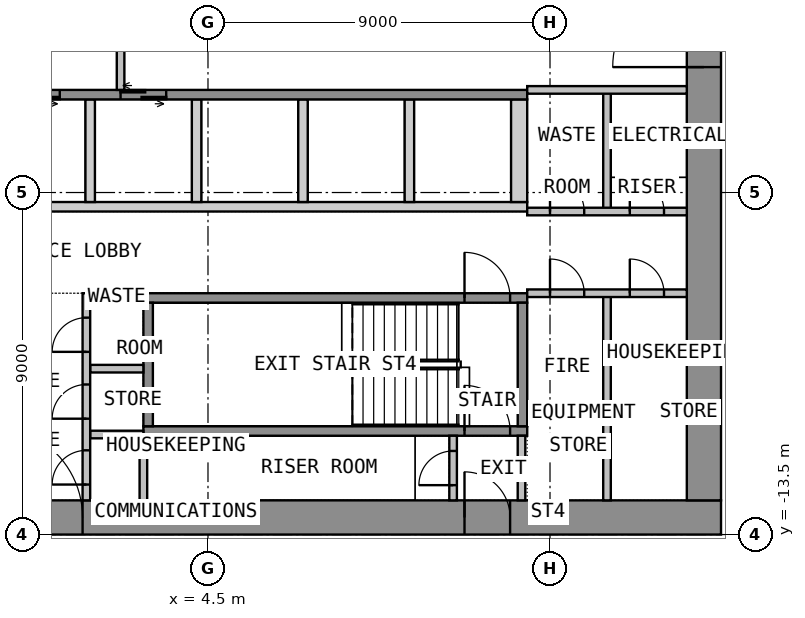
"""IFC4 building model, lengths in metres.
Left out: names, types, materials, properties, quantities, classifications, styles, units other than length and angle.
Written with IfcOpenShell. Run it as: python <this file> out.ifc"""

import sys

from ifc_helpers import new_model, si_unit, direction, frame, frame_2d, origin, place, context, subcontext, project, spatial, polyline, rectangle, outline, extrude, element, fill, save


model = new_model("IFC4")
c1 = context("Model", 3, precision=1e-05, world=origin(), true_north=direction((0.0, 1.0)))
c2 = subcontext(c1, "Body", "Model", "MODEL_VIEW")
j1 = project(units=[si_unit("LENGTHUNIT", "METRE"), si_unit("PLANEANGLEUNIT", "RADIAN")], contexts=[c1])
p1 = place(None, origin())
s1 = spatial("IfcSite", under=j1, at=p1, CompositionType="ELEMENT")
p2 = place(p1, origin())
s2 = spatial("IfcBuilding", under=s1, at=p2, CompositionType="ELEMENT")
p3 = place(p2, frame((0.0, 0.0, 30.0)))
s3 = spatial("IfcBuildingStorey", under=s2, at=p3, CompositionType="ELEMENT", Elevation=30.0)
p4 = place(p3, frame((-18.0, -13.05, 0.0), z_axis=(0.0, 0.0, 1.0), x_axis=(1.0, 0.0, 0.0)))
e1 = element("IfcWall", 1, at=p4, inside=s3, PredefinedType="SHEAR", context=c2, shape_type="SweptSolid", body=[
    extrude(rectangle(XDim=36.0, YDim=0.9, at=frame_2d((18.0, 0.0))), origin(), (0.0, 0.0, 1.0), 3.525),
])
p5 = place(p4, frame((16.8, 0.0, 0.0)))
e2 = element("IfcOpeningElement", 2, at=p5, cuts=e1, PredefinedType="OPENING", context=c2, shape_type="SweptSolid", body=[
    extrude(rectangle(XDim=2.4, YDim=2.1, at=frame_2d((1.2, 1.05))), frame((0.0, 0.46, 0.0), z_axis=(0.0, -1.0, 0.0), x_axis=(1.0, 0.0, 0.0)), (0.0, 0.0, 1.0), 0.92),
])
p6 = place(p4, frame((5.55, 0.0, 0.0)))
e3 = element("IfcOpeningElement", 3, at=p6, cuts=e1, PredefinedType="OPENING", context=c2, shape_type="SweptSolid", body=[
    extrude(rectangle(XDim=1.2, YDim=2.1, at=frame_2d((0.6, 1.05))), frame((0.0, 0.46, 0.0), z_axis=(0.0, -1.0, 0.0), x_axis=(1.0, 0.0, 0.0)), (0.0, 0.0, 1.0), 0.92),
])
p7 = place(p4, frame((29.25, 0.0, 0.0)))
e4 = element("IfcOpeningElement", 4, at=p7, cuts=e1, PredefinedType="OPENING", context=c2, shape_type="SweptSolid", body=[
    extrude(rectangle(XDim=1.2, YDim=2.1, at=frame_2d((0.6, 1.05))), frame((0.0, 0.46, 0.0), z_axis=(0.0, -1.0, 0.0), x_axis=(1.0, 0.0, 0.0)), (0.0, 0.0, 1.0), 0.92),
])
p8 = place(p3, frame((17.55, -12.6, 0.0), z_axis=(0.0, 0.0, 1.0), x_axis=(0.0, 1.0, 0.0)))
e5 = element("IfcWall", 5, at=p8, inside=s3, PredefinedType="SHEAR", context=c2, shape_type="SweptSolid", body=[
    extrude(rectangle(XDim=25.2, YDim=0.9, at=frame_2d((12.6, 0.0))), origin(), (0.0, 0.0, 1.0), 3.525),
])
p9 = place(p8, frame((11.4, 0.0, 0.0)))
e6 = element("IfcOpeningElement", 6, at=p9, cuts=e5, PredefinedType="OPENING", context=c2, shape_type="SweptSolid", body=[
    extrude(rectangle(XDim=2.4, YDim=2.1, at=frame_2d((1.2, 1.05))), frame((0.0, 0.46, 0.0), z_axis=(0.0, -1.0, 0.0), x_axis=(1.0, 0.0, 0.0)), (0.0, 0.0, 1.0), 0.92),
])
p10 = place(p3, origin())
e7 = element("IfcWall", 7, at=p10, inside=s3, PredefinedType="SHEAR", context=c2, shape_type="SweptSolid", body=[
    extrude(outline(polyline([(-12.9, -5.0), (12.9, -5.0), (12.9, -4.75), (-12.9, -4.75), (-12.9, -5.0)])), origin(), (0.0, 0.0, 1.0), 3.525),
])
p11 = place(p3, origin())
e8 = element("IfcWall", 8, at=p11, inside=s3, PredefinedType="SHEAR", context=c2, shape_type="SweptSolid", body=[
    extrude(outline(polyline([(1.275, -4.75), (1.525, -4.75), (1.525, -2.05), (1.275, -2.05), (1.275, -4.75)])), origin(), (0.0, 0.0, 1.0), 3.525),
])
p12 = place(p3, origin())
e9 = element("IfcWall", 9, at=p12, inside=s3, PredefinedType="SHEAR", context=c2, shape_type="SweptSolid", body=[
    extrude(outline(polyline([(4.075, -4.75), (4.325, -4.75), (4.325, -2.05), (4.075, -2.05), (4.075, -4.75)])), origin(), (0.0, 0.0, 1.0), 3.525),
])
p13 = place(p3, origin())
e10 = element("IfcWall", 10, at=p13, inside=s3, PredefinedType="SHEAR", context=c2, shape_type="SweptSolid", body=[
    extrude(outline(polyline([(6.875, -4.75), (7.125, -4.75), (7.125, -2.05), (6.875, -2.05), (6.875, -4.75)])), origin(), (0.0, 0.0, 1.0), 3.525),
])
p14 = place(p3, origin())
e11 = element("IfcWall", 11, at=p14, inside=s3, PredefinedType="SHEAR", context=c2, shape_type="SweptSolid", body=[
    extrude(outline(polyline([(9.675, -4.75), (9.925, -4.75), (9.925, -2.05), (9.675, -2.05), (9.675, -4.75)])), origin(), (0.0, 0.0, 1.0), 3.525),
])
p15 = place(p3, origin())
e12 = element("IfcWall", 12, at=p15, inside=s3, PredefinedType="SHEAR", context=c2, shape_type="SweptSolid", body=[
    extrude(outline(polyline([(12.475, -4.75), (12.9, -4.75), (12.9, -2.05), (12.475, -2.05), (12.475, -4.75)])), origin(), (0.0, 0.0, 1.0), 3.525),
])
p16 = place(p3, frame((-12.9, -1.925, 0.0), z_axis=(0.0, 0.0, 1.0), x_axis=(1.0, 0.0, 0.0)))
e13 = element("IfcWall", 13, at=p16, inside=s3, PredefinedType="SHEAR", context=c2, shape_type="SweptSolid", body=[
    extrude(rectangle(XDim=25.8, YDim=0.25, at=frame_2d((12.9, 0.0))), origin(), (0.0, 0.0, 1.0), 3.525),
])
p17 = place(p16, frame((1.1, 0.0, 0.0)))
e14 = element("IfcOpeningElement", 14, at=p17, cuts=e13, PredefinedType="OPENING", context=c2, shape_type="SweptSolid", body=[
    extrude(rectangle(XDim=1.2, YDim=2.1, at=frame_2d((0.6, 1.05))), frame((0.0, 0.135, 0.0), z_axis=(0.0, -1.0, 0.0), x_axis=(1.0, 0.0, 0.0)), (0.0, 0.0, 1.0), 0.27),
])
p18 = place(p16, frame((3.9, 0.0, 0.0)))
e15 = element("IfcOpeningElement", 15, at=p18, cuts=e13, PredefinedType="OPENING", context=c2, shape_type="SweptSolid", body=[
    extrude(rectangle(XDim=1.2, YDim=2.1, at=frame_2d((0.6, 1.05))), frame((0.0, 0.135, 0.0), z_axis=(0.0, -1.0, 0.0), x_axis=(1.0, 0.0, 0.0)), (0.0, 0.0, 1.0), 0.27),
])
p19 = place(p16, frame((6.7, 0.0, 0.0)))
e16 = element("IfcOpeningElement", 16, at=p19, cuts=e13, PredefinedType="OPENING", context=c2, shape_type="SweptSolid", body=[
    extrude(rectangle(XDim=1.2, YDim=2.1, at=frame_2d((0.6, 1.05))), frame((0.0, 0.135, 0.0), z_axis=(0.0, -1.0, 0.0), x_axis=(1.0, 0.0, 0.0)), (0.0, 0.0, 1.0), 0.27),
])
p20 = place(p16, frame((9.5, 0.0, 0.0)))
e17 = element("IfcOpeningElement", 17, at=p20, cuts=e13, PredefinedType="OPENING", context=c2, shape_type="SweptSolid", body=[
    extrude(rectangle(XDim=1.2, YDim=2.1, at=frame_2d((0.6, 1.05))), frame((0.0, 0.135, 0.0), z_axis=(0.0, -1.0, 0.0), x_axis=(1.0, 0.0, 0.0)), (0.0, 0.0, 1.0), 0.27),
])
p21 = place(p16, frame((12.3, 0.0, 0.0)))
e18 = element("IfcOpeningElement", 18, at=p21, cuts=e13, PredefinedType="OPENING", context=c2, shape_type="SweptSolid", body=[
    extrude(rectangle(XDim=1.2, YDim=2.1, at=frame_2d((0.6, 1.05))), frame((0.0, 0.135, 0.0), z_axis=(0.0, -1.0, 0.0), x_axis=(1.0, 0.0, 0.0)), (0.0, 0.0, 1.0), 0.27),
])
p22 = place(p16, frame((15.1, 0.0, 0.0)))
e19 = element("IfcOpeningElement", 19, at=p22, cuts=e13, PredefinedType="OPENING", context=c2, shape_type="SweptSolid", body=[
    extrude(rectangle(XDim=1.2, YDim=2.1, at=frame_2d((0.6, 1.05))), frame((0.0, 0.135, 0.0), z_axis=(0.0, -1.0, 0.0), x_axis=(1.0, 0.0, 0.0)), (0.0, 0.0, 1.0), 0.27),
])
p23 = place(p3, frame((2.2, -1.8, 0.0), z_axis=(0.0, 0.0, 1.0), x_axis=(0.0, 1.0, 0.0)))
e20 = element("IfcWall", 20, at=p23, inside=s3, PredefinedType="PARTITIONING", context=c2, shape_type="SweptSolid", body=[
    extrude(rectangle(XDim=3.6, YDim=0.2, at=frame_2d((1.8, 0.0))), origin(), (0.0, 0.0, 1.0), 3.525),
])
p24 = place(p23, frame((1.2, 0.0, 0.0)))
e21 = element("IfcOpeningElement", 21, at=p24, cuts=e20, PredefinedType="OPENING", context=c2, shape_type="SweptSolid", body=[
    extrude(rectangle(XDim=1.2, YDim=2.1, at=frame_2d((0.6, 1.05))), frame((0.0, 0.11, 0.0), z_axis=(0.0, -1.0, 0.0), x_axis=(1.0, 0.0, 0.0)), (0.0, 0.0, 1.0), 0.22),
])
p25 = place(p3, frame((2.8, -10.775, 0.0), z_axis=(0.0, 0.0, 1.0), x_axis=(1.0, 0.0, 0.0)))
e22 = element("IfcWall", 22, at=p25, inside=s3, PredefinedType="SHEAR", context=c2, shape_type="SweptSolid", body=[
    extrude(rectangle(XDim=10.1, YDim=0.25, at=frame_2d((5.05, 0.0))), origin(), (0.0, 0.0, 1.0), 3.525),
])
p26 = place(p25, frame((8.45, 0.0, 0.0)))
e23 = element("IfcOpeningElement", 23, at=p26, cuts=e22, PredefinedType="OPENING", context=c2, shape_type="SweptSolid", body=[
    extrude(rectangle(XDim=1.2, YDim=2.1, at=frame_2d((0.6, 1.05))), frame((0.0, 0.135, 0.0), z_axis=(0.0, -1.0, 0.0), x_axis=(1.0, 0.0, 0.0)), (0.0, 0.0, 1.0), 0.27),
])
p27 = place(p3, frame((2.8, -7.275, 0.0), z_axis=(0.0, 0.0, 1.0), x_axis=(1.0, 0.0, 0.0)))
e24 = element("IfcWall", 24, at=p27, inside=s3, PredefinedType="SHEAR", context=c2, shape_type="SweptSolid", body=[
    extrude(rectangle(XDim=10.1, YDim=0.25, at=frame_2d((5.05, 0.0))), origin(), (0.0, 0.0, 1.0), 3.525),
])
p28 = place(p27, frame((8.45, 0.0, 0.0)))
e25 = element("IfcOpeningElement", 25, at=p28, cuts=e24, PredefinedType="OPENING", context=c2, shape_type="SweptSolid", body=[
    extrude(rectangle(XDim=1.2, YDim=2.1, at=frame_2d((0.6, 1.05))), frame((0.0, 0.135, 0.0), z_axis=(0.0, -1.0, 0.0), x_axis=(1.0, 0.0, 0.0)), (0.0, 0.0, 1.0), 0.27),
])
for number, where, z_axis, x_axis in (
    (26, (2.925, -10.65, 0.0), (0.0, 0.0, 1.0), (0.0, 1.0, 0.0)),
    (27, (12.775, -10.65, 0.0), (0.0, 0.0, 1.0), (0.0, 1.0, 0.0)),
):
    element("IfcWall", number, at=place(p3, frame(where, z_axis=z_axis, x_axis=x_axis)), inside=s3, PredefinedType="SHEAR", context=c2, shape_type="SweptSolid", body=[
        extrude(rectangle(XDim=3.25, YDim=0.25, at=frame_2d((1.625, 0.0))), origin(), (0.0, 0.0, 1.0), 3.525),
    ])
for number, where, z_axis, x_axis in (
    (28, (1.4, -7.25, 0.0), (0.0, 0.0, 1.0), (1.0, 0.0, 0.0)),
    (29, (1.4, -9.135, 0.0), (0.0, 0.0, 1.0), (1.0, 0.0, 0.0)),
    (30, (1.4, -10.867, 0.0), (0.0, 0.0, 1.0), (1.0, 0.0, 0.0)),
):
    element("IfcWall", number, at=place(p3, frame(where, z_axis=z_axis, x_axis=x_axis)), inside=s3, PredefinedType="PARTITIONING", context=c2, shape_type="SweptSolid", body=[
        extrude(rectangle(XDim=1.4, YDim=0.2, at=frame_2d((0.7, 0.0))), origin(), (0.0, 0.0, 1.0), 3.525),
    ])
p29 = place(p3, frame((1.3, -12.6, 0.0), z_axis=(0.0, 0.0, 1.0), x_axis=(0.0, 1.0, 0.0)))
e31 = element("IfcWall", 31, at=p29, inside=s3, PredefinedType="PARTITIONING", context=c2, shape_type="SweptSolid", body=[
    extrude(rectangle(XDim=5.45, YDim=0.2, at=frame_2d((2.725, 0.0))), origin(), (0.0, 0.0, 1.0), 3.525),
])
p30 = place(p29, frame((0.416, 0.0, 0.0)))
e32 = element("IfcOpeningElement", 32, at=p30, cuts=e31, PredefinedType="OPENING", context=c2, shape_type="SweptSolid", body=[
    extrude(rectangle(XDim=0.9, YDim=2.1, at=frame_2d((0.45, 1.05))), frame((0.0, 0.11, 0.0), z_axis=(0.0, -1.0, 0.0), x_axis=(1.0, 0.0, 0.0)), (0.0, 0.0, 1.0), 0.22),
])
p31 = place(p29, frame((2.149, 0.0, 0.0)))
e33 = element("IfcOpeningElement", 33, at=p31, cuts=e31, PredefinedType="OPENING", context=c2, shape_type="SweptSolid", body=[
    extrude(rectangle(XDim=0.9, YDim=2.1, at=frame_2d((0.45, 1.05))), frame((0.0, 0.11, 0.0), z_axis=(0.0, -1.0, 0.0), x_axis=(1.0, 0.0, 0.0)), (0.0, 0.0, 1.0), 0.22),
])
p32 = place(p29, frame((3.907, 0.0, 0.0)))
e34 = element("IfcOpeningElement", 34, at=p32, cuts=e31, PredefinedType="OPENING", context=c2, shape_type="SweptSolid", body=[
    extrude(rectangle(XDim=0.9, YDim=2.1, at=frame_2d((0.45, 1.05))), frame((0.0, 0.11, 0.0), z_axis=(0.0, -1.0, 0.0), x_axis=(1.0, 0.0, 0.0)), (0.0, 0.0, 1.0), 0.22),
])
p33 = place(p3, frame((12.75, -12.6, 0.0), z_axis=(0.0, 0.0, 1.0), x_axis=(0.0, 1.0, 0.0)))
e35 = element("IfcWall", 35, at=p33, inside=s3, PredefinedType="PARTITIONING", context=c2, shape_type="SweptSolid", body=[
    extrude(rectangle(XDim=1.7, YDim=0.2, at=frame_2d((0.85, 0.0))), origin(), (0.0, 0.0, 1.0), 3.525),
])
p34 = place(p3, frame((10.95, -12.6, 0.0), z_axis=(0.0, 0.0, 1.0), x_axis=(0.0, 1.0, 0.0)))
e36 = element("IfcWall", 36, at=p34, inside=s3, PredefinedType="PARTITIONING", context=c2, shape_type="SweptSolid", body=[
    extrude(rectangle(XDim=1.7, YDim=0.2, at=frame_2d((0.85, 0.0))), origin(), (0.0, 0.0, 1.0), 3.525),
])
p35 = place(p34, frame((0.4, 0.0, 0.0)))
e37 = element("IfcOpeningElement", 37, at=p35, cuts=e36, PredefinedType="OPENING", context=c2, shape_type="SweptSolid", body=[
    extrude(rectangle(XDim=0.9, YDim=2.1, at=frame_2d((0.45, 1.05))), frame((0.0, 0.11, 0.0), z_axis=(0.0, -1.0, 0.0), x_axis=(1.0, 0.0, 0.0)), (0.0, 0.0, 1.0), 0.22),
])
p36 = place(p3, frame((15.0, -12.6, 0.0), z_axis=(0.0, 0.0, 1.0), x_axis=(0.0, 1.0, 0.0)))
e38 = element("IfcWall", 38, at=p36, inside=s3, PredefinedType="PARTITIONING", context=c2, shape_type="SweptSolid", body=[
    extrude(rectangle(XDim=5.45, YDim=0.2, at=frame_2d((2.725, 0.0))), origin(), (0.0, 0.0, 1.0), 3.525),
])
p37 = place(p3, frame((12.9, -7.15, 0.0), z_axis=(0.0, 0.0, 1.0), x_axis=(1.0, 0.0, 0.0)))
e39 = element("IfcWall", 39, at=p37, inside=s3, PredefinedType="PARTITIONING", context=c2, shape_type="SweptSolid", body=[
    extrude(rectangle(XDim=4.2, YDim=0.2, at=frame_2d((2.1, 0.0))), origin(), (0.0, 0.0, 1.0), 3.525),
])
p38 = place(p37, frame((0.6, 0.0, 0.0)))
e40 = element("IfcOpeningElement", 40, at=p38, cuts=e39, PredefinedType="OPENING", context=c2, shape_type="SweptSolid", body=[
    extrude(rectangle(XDim=0.9, YDim=2.1, at=frame_2d((0.45, 1.05))), frame((0.0, 0.11, 0.0), z_axis=(0.0, -1.0, 0.0), x_axis=(1.0, 0.0, 0.0)), (0.0, 0.0, 1.0), 0.22),
])
p39 = place(p37, frame((2.7, 0.0, 0.0)))
e41 = element("IfcOpeningElement", 41, at=p39, cuts=e39, PredefinedType="OPENING", context=c2, shape_type="SweptSolid", body=[
    extrude(rectangle(XDim=0.9, YDim=2.1, at=frame_2d((0.45, 1.05))), frame((0.0, 0.11, 0.0), z_axis=(0.0, -1.0, 0.0), x_axis=(1.0, 0.0, 0.0)), (0.0, 0.0, 1.0), 0.22),
])
p40 = place(p3, frame((15.0, -5.0, 0.0), z_axis=(0.0, 0.0, 1.0), x_axis=(0.0, 1.0, 0.0)))
e42 = element("IfcWall", 42, at=p40, inside=s3, PredefinedType="PARTITIONING", context=c2, shape_type="SweptSolid", body=[
    extrude(rectangle(XDim=3.2, YDim=0.2, at=frame_2d((1.6, 0.0))), origin(), (0.0, 0.0, 1.0), 3.525),
])
p41 = place(p3, frame((12.9, -5.0, 0.0), z_axis=(0.0, 0.0, 1.0), x_axis=(1.0, 0.0, 0.0)))
e43 = element("IfcWall", 43, at=p41, inside=s3, PredefinedType="PARTITIONING", context=c2, shape_type="SweptSolid", body=[
    extrude(rectangle(XDim=4.2, YDim=0.2, at=frame_2d((2.1, 0.0))), origin(), (0.0, 0.0, 1.0), 3.525),
])
p42 = place(p41, frame((0.6, 0.0, 0.0)))
e44 = element("IfcOpeningElement", 44, at=p42, cuts=e43, PredefinedType="OPENING", context=c2, shape_type="SweptSolid", body=[
    extrude(rectangle(XDim=0.9, YDim=2.1, at=frame_2d((0.45, 1.05))), frame((0.0, 0.11, 0.0), z_axis=(0.0, -1.0, 0.0), x_axis=(1.0, 0.0, 0.0)), (0.0, 0.0, 1.0), 0.22),
])
p43 = place(p41, frame((2.7, 0.0, 0.0)))
e45 = element("IfcOpeningElement", 45, at=p43, cuts=e43, PredefinedType="OPENING", context=c2, shape_type="SweptSolid", body=[
    extrude(rectangle(XDim=0.9, YDim=2.1, at=frame_2d((0.45, 1.05))), frame((0.0, 0.11, 0.0), z_axis=(0.0, -1.0, 0.0), x_axis=(1.0, 0.0, 0.0)), (0.0, 0.0, 1.0), 0.22),
])
p44 = place(p3, frame((12.9, -1.8, 0.0), z_axis=(0.0, 0.0, 1.0), x_axis=(1.0, 0.0, 0.0)))
e46 = element("IfcWall", 46, at=p44, inside=s3, PredefinedType="PARTITIONING", context=c2, shape_type="SweptSolid", body=[
    extrude(rectangle(XDim=4.2, YDim=0.2, at=frame_2d((2.1, 0.0))), origin(), (0.0, 0.0, 1.0), 3.525),
])
p45 = place(p3, frame((2.8, -10.969, 0.0), z_axis=(0.0, 0.0, 1.0), x_axis=(0.0, -1.0, 0.0)))
e47 = element("IfcWall", 47, at=p45, inside=s3, PredefinedType="PARTITIONING", context=c2, shape_type="SweptSolid", body=[
    extrude(rectangle(XDim=1.631, YDim=0.2, at=frame_2d((0.815, 0.0))), origin(), (0.0, 0.0, 1.0), 3.525),
])
p46 = place(p9, origin())
e48 = element("IfcDoor", 48, at=p46, inside=s3, OperationType="DOUBLE_DOOR_DOUBLE_SWING", PredefinedType="DOOR", context=c2, shape_type="SweptSolid", body=[
    extrude(rectangle(XDim=2.4, YDim=2.1, at=frame_2d((1.2, 1.05))), frame((0.0, 0.025, 0.0), z_axis=(0.0, -1.0, 0.0), x_axis=(1.0, 0.0, 0.0)), (0.0, 0.0, 1.0), 0.05),
])
fill(e6, e48)
p47 = place(p5, origin())
e49 = element("IfcDoor", 49, at=p47, inside=s3, OperationType="DOUBLE_DOOR_DOUBLE_SWING", PredefinedType="DOOR", context=c2, shape_type="SweptSolid", body=[
    extrude(rectangle(XDim=2.4, YDim=2.1, at=frame_2d((1.2, 1.05))), frame((0.0, 0.025, 0.0), z_axis=(0.0, -1.0, 0.0), x_axis=(1.0, 0.0, 0.0)), (0.0, 0.0, 1.0), 0.05),
])
fill(e2, e49)
p48 = place(p7, origin())
e50 = element("IfcDoor", 50, at=p48, inside=s3, OperationType="SINGLE_SWING_RIGHT", PredefinedType="DOOR", context=c2, shape_type="SweptSolid", body=[
    extrude(rectangle(XDim=1.2, YDim=2.1, at=frame_2d((0.6, 1.05))), frame((0.0, 0.025, 0.0), z_axis=(0.0, -1.0, 0.0), x_axis=(1.0, 0.0, 0.0)), (0.0, 0.0, 1.0), 0.05),
])
fill(e4, e50)
p49 = place(p21, origin())
e51 = element("IfcDoor", 51, at=p49, inside=s3, OperationType="DOUBLE_DOOR_SLIDING", PredefinedType="DOOR", context=c2, shape_type="SweptSolid", body=[
    extrude(rectangle(XDim=1.2, YDim=2.1, at=frame_2d((0.6, 1.05))), frame((0.0, 0.025, 0.0), z_axis=(0.0, -1.0, 0.0), x_axis=(1.0, 0.0, 0.0)), (0.0, 0.0, 1.0), 0.05),
])
fill(e18, e51)
p50 = place(p22, origin())
e52 = element("IfcDoor", 52, at=p50, inside=s3, OperationType="DOUBLE_DOOR_SLIDING", PredefinedType="DOOR", context=c2, shape_type="SweptSolid", body=[
    extrude(rectangle(XDim=1.2, YDim=2.1, at=frame_2d((0.6, 1.05))), frame((0.0, 0.025, 0.0), z_axis=(0.0, -1.0, 0.0), x_axis=(1.0, 0.0, 0.0)), (0.0, 0.0, 1.0), 0.05),
])
fill(e19, e52)
p51 = place(p28, origin())
e53 = element("IfcDoor", 53, at=p51, inside=s3, OperationType="SINGLE_SWING_LEFT", PredefinedType="DOOR", context=c2, shape_type="SweptSolid", body=[
    extrude(rectangle(XDim=1.2, YDim=2.1, at=frame_2d((0.6, 1.05))), frame((0.0, 0.025, 0.0), z_axis=(0.0, -1.0, 0.0), x_axis=(1.0, 0.0, 0.0)), (0.0, 0.0, 1.0), 0.05),
])
fill(e25, e53)
p52 = place(p30, origin())
e54 = element("IfcDoor", 54, at=p52, inside=s3, OperationType="SINGLE_SWING_LEFT", PredefinedType="DOOR", context=c2, shape_type="SweptSolid", body=[
    extrude(rectangle(XDim=0.9, YDim=2.1, at=frame_2d((0.45, 1.05))), frame((0.0, 0.025, 0.0), z_axis=(0.0, -1.0, 0.0), x_axis=(1.0, 0.0, 0.0)), (0.0, 0.0, 1.0), 0.05),
])
fill(e32, e54)
p53 = place(p31, origin())
e55 = element("IfcDoor", 55, at=p53, inside=s3, OperationType="SINGLE_SWING_LEFT", PredefinedType="DOOR", context=c2, shape_type="SweptSolid", body=[
    extrude(rectangle(XDim=0.9, YDim=2.1, at=frame_2d((0.45, 1.05))), frame((0.0, 0.025, 0.0), z_axis=(0.0, -1.0, 0.0), x_axis=(1.0, 0.0, 0.0)), (0.0, 0.0, 1.0), 0.05),
])
fill(e33, e55)
p54 = place(p32, origin())
e56 = element("IfcDoor", 56, at=p54, inside=s3, OperationType="SINGLE_SWING_LEFT", PredefinedType="DOOR", context=c2, shape_type="SweptSolid", body=[
    extrude(rectangle(XDim=0.9, YDim=2.1, at=frame_2d((0.45, 1.05))), frame((0.0, 0.025, 0.0), z_axis=(0.0, -1.0, 0.0), x_axis=(1.0, 0.0, 0.0)), (0.0, 0.0, 1.0), 0.05),
])
fill(e34, e56)
p55 = place(p26, origin())
e57 = element("IfcDoor", 57, at=p55, inside=s3, OperationType="SINGLE_SWING_RIGHT", PredefinedType="DOOR", context=c2, shape_type="SweptSolid", body=[
    extrude(rectangle(XDim=1.2, YDim=2.1, at=frame_2d((0.6, 1.05))), frame((0.0, 0.025, 0.0), z_axis=(0.0, -1.0, 0.0), x_axis=(1.0, 0.0, 0.0)), (0.0, 0.0, 1.0), 0.05),
])
fill(e23, e57)
p56 = place(p35, origin())
e58 = element("IfcDoor", 58, at=p56, inside=s3, OperationType="SINGLE_SWING_LEFT", PredefinedType="DOOR", context=c2, shape_type="SweptSolid", body=[
    extrude(rectangle(XDim=0.9, YDim=2.1, at=frame_2d((0.45, 1.05))), frame((0.0, 0.025, 0.0), z_axis=(0.0, -1.0, 0.0), x_axis=(1.0, 0.0, 0.0)), (0.0, 0.0, 1.0), 0.05),
])
fill(e37, e58)
p57 = place(p38, origin())
e59 = element("IfcDoor", 59, at=p57, inside=s3, OperationType="SINGLE_SWING_LEFT", PredefinedType="DOOR", context=c2, shape_type="SweptSolid", body=[
    extrude(rectangle(XDim=0.9, YDim=2.1, at=frame_2d((0.45, 1.05))), frame((0.0, 0.025, 0.0), z_axis=(0.0, -1.0, 0.0), x_axis=(1.0, 0.0, 0.0)), (0.0, 0.0, 1.0), 0.05),
])
fill(e40, e59)
p58 = place(p39, origin())
e60 = element("IfcDoor", 60, at=p58, inside=s3, OperationType="SINGLE_SWING_LEFT", PredefinedType="DOOR", context=c2, shape_type="SweptSolid", body=[
    extrude(rectangle(XDim=0.9, YDim=2.1, at=frame_2d((0.45, 1.05))), frame((0.0, 0.025, 0.0), z_axis=(0.0, -1.0, 0.0), x_axis=(1.0, 0.0, 0.0)), (0.0, 0.0, 1.0), 0.05),
])
fill(e41, e60)
p59 = place(p42, origin())
e61 = element("IfcDoor", 61, at=p59, inside=s3, OperationType="SINGLE_SWING_LEFT", PredefinedType="DOOR", context=c2, shape_type="SweptSolid", body=[
    extrude(rectangle(XDim=0.9, YDim=2.1, at=frame_2d((0.45, 1.05))), frame((0.0, 0.025, 0.0), z_axis=(0.0, -1.0, 0.0), x_axis=(1.0, 0.0, 0.0)), (0.0, 0.0, 1.0), 0.05),
])
fill(e44, e61)
p60 = place(p43, origin())
e62 = element("IfcDoor", 62, at=p60, inside=s3, OperationType="SINGLE_SWING_LEFT", PredefinedType="DOOR", context=c2, shape_type="SweptSolid", body=[
    extrude(rectangle(XDim=0.9, YDim=2.1, at=frame_2d((0.45, 1.05))), frame((0.0, 0.025, 0.0), z_axis=(0.0, -1.0, 0.0), x_axis=(1.0, 0.0, 0.0)), (0.0, 0.0, 1.0), 0.05),
])
fill(e45, e62)
save(model, sys.argv[1])
